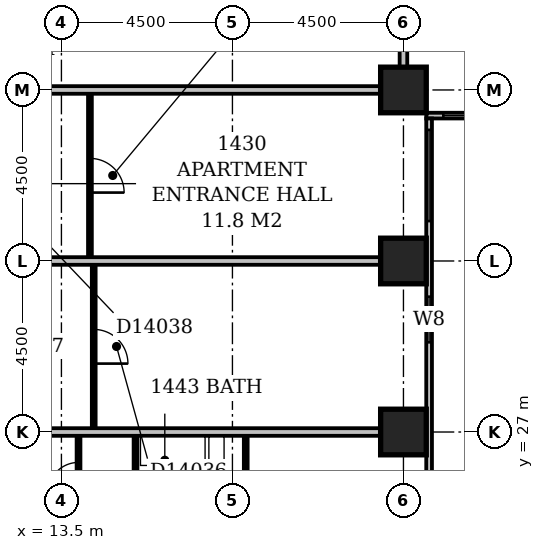
"""IFC4 building model, lengths in metres.
Left out: names, types, materials, properties, quantities, classifications, styles, units other than length and angle.
Written with IfcOpenShell. Run it as: python <this file> out.ifc"""

import sys

from ifc_helpers import new_model, si_unit, direction, frame, frame_2d, origin, origin_2d, place, context, subcontext, project, spatial, rectangle, extrude, element, fill, save


model = new_model("IFC4")
c1 = context("Model", 3, precision=1e-05, world=origin(), true_north=direction((0.0, 1.0)))
c2 = subcontext(c1, "Body", "Model", "MODEL_VIEW")
j1 = project(units=[si_unit("LENGTHUNIT", "METRE"), si_unit("PLANEANGLEUNIT", "RADIAN")], contexts=[c1])
p1 = place(None, origin())
s1 = spatial("IfcSite", under=j1, at=p1, CompositionType="ELEMENT")
p2 = place(p1, origin())
s2 = spatial("IfcBuilding", under=s1, at=p2, CompositionType="ELEMENT")
p3 = place(p2, frame((0.0, 0.0, 61.4)))
s3 = spatial("IfcBuildingStorey", under=s2, at=p3, CompositionType="ELEMENT", Elevation=61.4)
for number, where, z_axis, x_axis in (
    (1, (22.5, 27.0, -0.3), (0.0, 0.0, 1.0), (1.0, 0.0, 0.0)),
    (2, (22.5, 31.5, -0.3), (0.0, 0.0, 1.0), (1.0, 0.0, 0.0)),
    (3, (22.5, 36.0, -0.3), (0.0, 0.0, 1.0), (1.0, 0.0, 0.0)),
):
    element("IfcColumn", number, at=place(p3, frame(where, z_axis=z_axis, x_axis=x_axis)), inside=s3, PredefinedType="COLUMN", context=c2, shape_type="SweptSolid", body=[
        extrude(rectangle(XDim=1.2, YDim=1.2, at=origin_2d()), origin(), (0.0, 0.0, 1.0), 3.6),
    ])
p4 = place(p3, frame((23.175, 17.4, 0.0), z_axis=(0.0, 0.0, 1.0), x_axis=(0.0, 1.0, 0.0)))
e4 = element("IfcWall", 4, at=p4, inside=s3, PredefinedType="STANDARD", context=c2, shape_type="SweptSolid", body=[
    extrude(rectangle(XDim=17.85, YDim=0.15, at=frame_2d((8.925, 0.0))), origin(), (0.0, 0.0, 1.0), 2.7),
])
p5 = place(p4, frame((1.65, 0.0, 0.6)))
e5 = element("IfcOpeningElement", 5, at=p5, cuts=e4, PredefinedType="OPENING", context=c2, shape_type="SweptSolid", body=[
    extrude(rectangle(XDim=2.4, YDim=1.8, at=frame_2d((1.2, 0.9))), frame((0.0, 0.087, 0.0), z_axis=(0.0, -1.0, 0.0), x_axis=(1.0, 0.0, 0.0)), (0.0, 0.0, 1.0), 0.174),
])
p6 = place(p4, frame((6.15, 0.0, 0.6)))
e6 = element("IfcOpeningElement", 6, at=p6, cuts=e4, PredefinedType="OPENING", context=c2, shape_type="SweptSolid", body=[
    extrude(rectangle(XDim=2.4, YDim=1.8, at=frame_2d((1.2, 0.9))), frame((0.0, 0.087, 0.0), z_axis=(0.0, -1.0, 0.0), x_axis=(1.0, 0.0, 0.0)), (0.0, 0.0, 1.0), 0.174),
])
p7 = place(p4, frame((11.961, 0.0, 0.6)))
e7 = element("IfcOpeningElement", 7, at=p7, cuts=e4, PredefinedType="OPENING", context=c2, shape_type="SweptSolid", body=[
    extrude(rectangle(XDim=1.2, YDim=1.8, at=frame_2d((0.6, 0.9))), frame((0.0, 0.087, 0.0), z_axis=(0.0, -1.0, 0.0), x_axis=(1.0, 0.0, 0.0)), (0.0, 0.0, 1.0), 0.174),
])
p8 = place(p4, frame((15.15, 0.0, 0.6)))
e8 = element("IfcOpeningElement", 8, at=p8, cuts=e4, PredefinedType="OPENING", context=c2, shape_type="SweptSolid", body=[
    extrude(rectangle(XDim=2.4, YDim=1.8, at=frame_2d((1.2, 0.9))), frame((0.0, 0.087, 0.0), z_axis=(0.0, -1.0, 0.0), x_axis=(1.0, 0.0, 0.0)), (0.0, 0.0, 1.0), 0.174),
])
p9 = place(p3, frame((23.1, 35.325, 0.0), z_axis=(0.0, 0.0, 1.0), x_axis=(1.0, 0.0, 0.0)))
e9 = element("IfcWall", 9, at=p9, inside=s3, PredefinedType="STANDARD", context=c2, shape_type="SweptSolid", body=[
    extrude(rectangle(XDim=45.15, YDim=0.15, at=frame_2d((22.575, 0.0))), origin(), (0.0, 0.0, 1.0), 2.7),
])
p10 = place(p9, frame((0.45, 0.0, 0.6)))
e10 = element("IfcOpeningElement", 10, at=p10, cuts=e9, PredefinedType="OPENING", context=c2, shape_type="SweptSolid", body=[
    extrude(rectangle(XDim=2.4, YDim=1.8, at=frame_2d((1.2, 0.9))), frame((0.0, 0.087, 0.0), z_axis=(0.0, -1.0, 0.0), x_axis=(1.0, 0.0, 0.0)), (0.0, 0.0, 1.0), 0.174),
])
p11 = place(p9, frame((4.77, 0.0, 0.6)))
e11 = element("IfcOpeningElement", 11, at=p11, cuts=e9, PredefinedType="OPENING", context=c2, shape_type="SweptSolid", body=[
    extrude(rectangle(XDim=2.1, YDim=1.8, at=frame_2d((1.05, 0.9))), frame((0.0, 0.087, 0.0), z_axis=(0.0, -1.0, 0.0), x_axis=(1.0, 0.0, 0.0)), (0.0, 0.0, 1.0), 0.174),
])
p12 = place(p9, frame((9.45, 0.0, 0.6)))
e12 = element("IfcOpeningElement", 12, at=p12, cuts=e9, PredefinedType="OPENING", context=c2, shape_type="SweptSolid", body=[
    extrude(rectangle(XDim=2.4, YDim=1.8, at=frame_2d((1.2, 0.9))), frame((0.0, 0.087, 0.0), z_axis=(0.0, -1.0, 0.0), x_axis=(1.0, 0.0, 0.0)), (0.0, 0.0, 1.0), 0.174),
])
p13 = place(p9, frame((13.95, 0.0, 0.6)))
e13 = element("IfcOpeningElement", 13, at=p13, cuts=e9, PredefinedType="OPENING", context=c2, shape_type="SweptSolid", body=[
    extrude(rectangle(XDim=2.4, YDim=1.8, at=frame_2d((1.2, 0.9))), frame((0.0, 0.087, 0.0), z_axis=(0.0, -1.0, 0.0), x_axis=(1.0, 0.0, 0.0)), (0.0, 0.0, 1.0), 0.174),
])
p14 = place(p9, frame((19.47, 0.0, 0.6)))
e14 = element("IfcOpeningElement", 14, at=p14, cuts=e9, PredefinedType="OPENING", context=c2, shape_type="SweptSolid", body=[
    extrude(rectangle(XDim=1.5, YDim=1.8, at=frame_2d((0.75, 0.9))), frame((0.0, 0.087, 0.0), z_axis=(0.0, -1.0, 0.0), x_axis=(1.0, 0.0, 0.0)), (0.0, 0.0, 1.0), 0.174),
])
p15 = place(p9, frame((22.95, 0.0, 0.6)))
e15 = element("IfcOpeningElement", 15, at=p15, cuts=e9, PredefinedType="OPENING", context=c2, shape_type="SweptSolid", body=[
    extrude(rectangle(XDim=2.4, YDim=1.8, at=frame_2d((1.2, 0.9))), frame((0.0, 0.087, 0.0), z_axis=(0.0, -1.0, 0.0), x_axis=(1.0, 0.0, 0.0)), (0.0, 0.0, 1.0), 0.174),
])
p16 = place(p9, frame((27.45, 0.0, 0.6)))
e16 = element("IfcOpeningElement", 16, at=p16, cuts=e9, PredefinedType="OPENING", context=c2, shape_type="SweptSolid", body=[
    extrude(rectangle(XDim=2.4, YDim=1.8, at=frame_2d((1.2, 0.9))), frame((0.0, 0.087, 0.0), z_axis=(0.0, -1.0, 0.0), x_axis=(1.0, 0.0, 0.0)), (0.0, 0.0, 1.0), 0.174),
])
p17 = place(p9, frame((31.95, 0.0, 0.6)))
e17 = element("IfcOpeningElement", 17, at=p17, cuts=e9, PredefinedType="OPENING", context=c2, shape_type="SweptSolid", body=[
    extrude(rectangle(XDim=2.4, YDim=1.8, at=frame_2d((1.2, 0.9))), frame((0.0, 0.087, 0.0), z_axis=(0.0, -1.0, 0.0), x_axis=(1.0, 0.0, 0.0)), (0.0, 0.0, 1.0), 0.174),
])
p18 = place(p9, frame((38.403, 0.0, 0.6)))
e18 = element("IfcOpeningElement", 18, at=p18, cuts=e9, PredefinedType="OPENING", context=c2, shape_type="SweptSolid", body=[
    extrude(rectangle(XDim=0.6, YDim=1.8, at=frame_2d((0.3, 0.9))), frame((0.0, 0.087, 0.0), z_axis=(0.0, -1.0, 0.0), x_axis=(1.0, 0.0, 0.0)), (0.0, 0.0, 1.0), 0.174),
])
p19 = place(p9, frame((40.95, 0.0, 0.6)))
e19 = element("IfcOpeningElement", 19, at=p19, cuts=e9, PredefinedType="OPENING", context=c2, shape_type="SweptSolid", body=[
    extrude(rectangle(XDim=2.4, YDim=1.8, at=frame_2d((1.2, 0.9))), frame((0.0, 0.087, 0.0), z_axis=(0.0, -1.0, 0.0), x_axis=(1.0, 0.0, 0.0)), (0.0, 0.0, 1.0), 0.174),
])
p20 = place(p3, frame((15.45, 18.1, 0.0), z_axis=(0.0, 0.0, 1.0), x_axis=(0.0, 1.0, 0.0)))
e20 = element("IfcWall", 20, at=p20, inside=s3, PredefinedType="PARTITIONING", context=c2, shape_type="SweptSolid", body=[
    extrude(rectangle(XDim=8.8, YDim=0.1, at=frame_2d((4.4, 0.0))), origin(), (0.0, 0.0, 1.0), 3.3),
])
p21 = place(p20, frame((1.7, 0.0, 0.0)))
e21 = element("IfcOpeningElement", 21, at=p21, cuts=e20, PredefinedType="OPENING", context=c2, shape_type="SweptSolid", body=[
    extrude(rectangle(XDim=0.9, YDim=2.1, at=frame_2d((0.45, 1.05))), frame((0.0, 0.062, 0.0), z_axis=(0.0, -1.0, 0.0), x_axis=(1.0, 0.0, 0.0)), (0.0, 0.0, 1.0), 0.124),
])
p22 = place(p20, frame((5.05, 0.0, 0.0)))
e22 = element("IfcOpeningElement", 22, at=p22, cuts=e20, PredefinedType="OPENING", context=c2, shape_type="SweptSolid", body=[
    extrude(rectangle(XDim=0.9, YDim=2.1, at=frame_2d((0.45, 1.05))), frame((0.0, 0.062, 0.0), z_axis=(0.0, -1.0, 0.0), x_axis=(1.0, 0.0, 0.0)), (0.0, 0.0, 1.0), 0.124),
])
p23 = place(p3, frame((13.95, 24.6, 0.0), z_axis=(0.0, 0.0, 1.0), x_axis=(0.0, 1.0, 0.0)))
e23 = element("IfcWall", 23, at=p23, inside=s3, PredefinedType="PARTITIONING", context=c2, shape_type="SweptSolid", body=[
    extrude(rectangle(XDim=2.3, YDim=0.1, at=frame_2d((1.15, 0.0))), origin(), (0.0, 0.0, 1.0), 3.3),
])
p24 = place(p23, frame((0.8, 0.0, 0.0)))
e24 = element("IfcOpeningElement", 24, at=p24, cuts=e23, PredefinedType="OPENING", context=c2, shape_type="SweptSolid", body=[
    extrude(rectangle(XDim=0.8, YDim=2.1, at=frame_2d((0.4, 1.05))), frame((0.0, 0.062, 0.0), z_axis=(0.0, -1.0, 0.0), x_axis=(1.0, 0.0, 0.0)), (0.0, 0.0, 1.0), 0.124),
])
p25 = place(p3, frame((18.35, 24.7, 0.0), z_axis=(0.0, 0.0, 1.0), x_axis=(0.0, 1.0, 0.0)))
e25 = element("IfcWall", 25, at=p25, inside=s3, PredefinedType="PLUMBINGWALL", context=c2, shape_type="SweptSolid", body=[
    extrude(rectangle(XDim=2.2, YDim=0.1, at=frame_2d((1.1, 0.0))), origin(), (0.0, 0.0, 1.0), 3.3),
])
p26 = place(p3, frame((9.1, 27.0, 0.0), z_axis=(0.0, 0.0, 1.0), x_axis=(1.0, 0.0, 0.0)))
e26 = element("IfcWall", 26, at=p26, inside=s3, PredefinedType="PARTITIONING", context=c2, shape_type="SweptSolid", body=[
    extrude(rectangle(XDim=12.8, YDim=0.2, at=frame_2d((6.4, 0.0))), origin(), (0.0, 0.0, 1.0), 2.7),
])
p27 = place(p3, frame((14.35, 27.1, 0.0), z_axis=(0.0, 0.0, 1.0), x_axis=(0.0, 1.0, 0.0)))
e27 = element("IfcWall", 27, at=p27, inside=s3, PredefinedType="PARTITIONING", context=c2, shape_type="SweptSolid", body=[
    extrude(rectangle(XDim=4.3, YDim=0.1, at=frame_2d((2.15, 0.0))), origin(), (0.0, 0.0, 1.0), 3.3),
])
p28 = place(p27, frame((1.7, 0.0, 0.0)))
e28 = element("IfcOpeningElement", 28, at=p28, cuts=e27, PredefinedType="OPENING", context=c2, shape_type="SweptSolid", body=[
    extrude(rectangle(XDim=0.9, YDim=2.1, at=frame_2d((0.45, 1.05))), frame((0.0, 0.062, 0.0), z_axis=(0.0, -1.0, 0.0), x_axis=(1.0, 0.0, 0.0)), (0.0, 0.0, 1.0), 0.124),
])
p29 = place(p3, frame((9.1, 31.5, 0.0), z_axis=(0.0, 0.0, 1.0), x_axis=(1.0, 0.0, 0.0)))
e29 = element("IfcWall", 29, at=p29, inside=s3, PredefinedType="PARTITIONING", context=c2, shape_type="SweptSolid", body=[
    extrude(rectangle(XDim=12.8, YDim=0.2, at=frame_2d((6.4, 0.0))), origin(), (0.0, 0.0, 1.0), 3.3),
])
p30 = place(p3, frame((14.25, 31.6, 0.0), z_axis=(0.0, 0.0, 1.0), x_axis=(0.0, 1.0, 0.0)))
e30 = element("IfcWall", 30, at=p30, inside=s3, PredefinedType="PARTITIONING", context=c2, shape_type="SweptSolid", body=[
    extrude(rectangle(XDim=4.3, YDim=0.1, at=frame_2d((2.15, 0.0))), origin(), (0.0, 0.0, 1.0), 3.3),
])
p31 = place(p30, frame((1.7, 0.0, 0.0)))
e31 = element("IfcOpeningElement", 31, at=p31, cuts=e30, PredefinedType="OPENING", context=c2, shape_type="SweptSolid", body=[
    extrude(rectangle(XDim=0.9, YDim=2.1, at=frame_2d((0.45, 1.05))), frame((0.0, 0.062, 0.0), z_axis=(0.0, -1.0, 0.0), x_axis=(1.0, 0.0, 0.0)), (0.0, 0.0, 1.0), 0.124),
])
p32 = place(p3, frame((9.1, 36.0, 0.0), z_axis=(0.0, 0.0, 1.0), x_axis=(1.0, 0.0, 0.0)))
e32 = element("IfcWall", 32, at=p32, inside=s3, PredefinedType="PARTITIONING", context=c2, shape_type="SweptSolid", body=[
    extrude(rectangle(XDim=12.8, YDim=0.2, at=frame_2d((6.4, 0.0))), origin(), (0.0, 0.0, 1.0), 2.4),
])
p33 = place(p3, frame((22.5, 36.6, 0.0), z_axis=(0.0, 0.0, 1.0), x_axis=(0.0, 1.0, 0.0)))
e33 = element("IfcWall", 33, at=p33, inside=s3, PredefinedType="PARTITIONING", context=c2, shape_type="SweptSolid", body=[
    extrude(rectangle(XDim=12.8, YDim=0.2, at=frame_2d((6.4, 0.0))), origin(), (0.0, 0.0, 1.0), 3.3),
])
p34 = place(p7, origin())
e34 = element("IfcWindow", 34, at=p34, inside=s3, PartitioningType="SINGLE_PANEL", PredefinedType="WINDOW", context=c2, shape_type="SweptSolid", body=[
    extrude(rectangle(XDim=1.2, YDim=1.8, at=frame_2d((0.6, 0.9))), frame((0.0, 0.03, 0.0), z_axis=(0.0, -1.0, 0.0), x_axis=(1.0, 0.0, 0.0)), (0.0, 0.0, 1.0), 0.06),
])
fill(e7, e34)
p35 = place(p8, origin())
e35 = element("IfcWindow", 35, at=p35, inside=s3, PartitioningType="SINGLE_PANEL", PredefinedType="WINDOW", context=c2, shape_type="SweptSolid", body=[
    extrude(rectangle(XDim=2.4, YDim=1.8, at=frame_2d((1.2, 0.9))), frame((0.0, 0.03, 0.0), z_axis=(0.0, -1.0, 0.0), x_axis=(1.0, 0.0, 0.0)), (0.0, 0.0, 1.0), 0.06),
])
fill(e8, e35)
p36 = place(p10, origin())
e36 = element("IfcWindow", 36, at=p36, inside=s3, PartitioningType="SINGLE_PANEL", PredefinedType="WINDOW", context=c2, shape_type="SweptSolid", body=[
    extrude(rectangle(XDim=2.4, YDim=1.8, at=frame_2d((1.2, 0.9))), frame((0.0, 0.03, 0.0), z_axis=(0.0, -1.0, 0.0), x_axis=(1.0, 0.0, 0.0)), (0.0, 0.0, 1.0), 0.06),
])
fill(e10, e36)
p37 = place(p24, origin())
e37 = element("IfcDoor", 37, at=p37, inside=s3, OperationType="SINGLE_SWING_LEFT", PredefinedType="DOOR", context=c2, shape_type="SweptSolid", body=[
    extrude(rectangle(XDim=0.8, YDim=2.1, at=frame_2d((0.4, 1.05))), frame((0.0, 0.025, 0.0), z_axis=(0.0, -1.0, 0.0), x_axis=(1.0, 0.0, 0.0)), (0.0, 0.0, 1.0), 0.05),
])
fill(e24, e37)
p38 = place(p28, frame((0.9, 0.0, 0.0), z_axis=(0.0, 0.0, 1.0), x_axis=(-1.0, 0.0, 0.0)))
e38 = element("IfcDoor", 38, at=p38, inside=s3, OperationType="SINGLE_SWING_RIGHT", PredefinedType="DOOR", context=c2, shape_type="SweptSolid", body=[
    extrude(rectangle(XDim=0.9, YDim=2.1, at=frame_2d((0.45, 1.05))), frame((0.0, 0.025, 0.0), z_axis=(0.0, -1.0, 0.0), x_axis=(1.0, 0.0, 0.0)), (0.0, 0.0, 1.0), 0.05),
])
fill(e28, e38)
p39 = place(p31, frame((0.9, 0.0, 0.0), z_axis=(0.0, 0.0, 1.0), x_axis=(-1.0, 0.0, 0.0)))
e39 = element("IfcDoor", 39, at=p39, inside=s3, OperationType="SINGLE_SWING_RIGHT", PredefinedType="DOOR", context=c2, shape_type="SweptSolid", body=[
    extrude(rectangle(XDim=0.9, YDim=2.1, at=frame_2d((0.45, 1.05))), frame((0.0, 0.025, 0.0), z_axis=(0.0, -1.0, 0.0), x_axis=(1.0, 0.0, 0.0)), (0.0, 0.0, 1.0), 0.05),
])
fill(e31, e39)
save(model, sys.argv[1])
